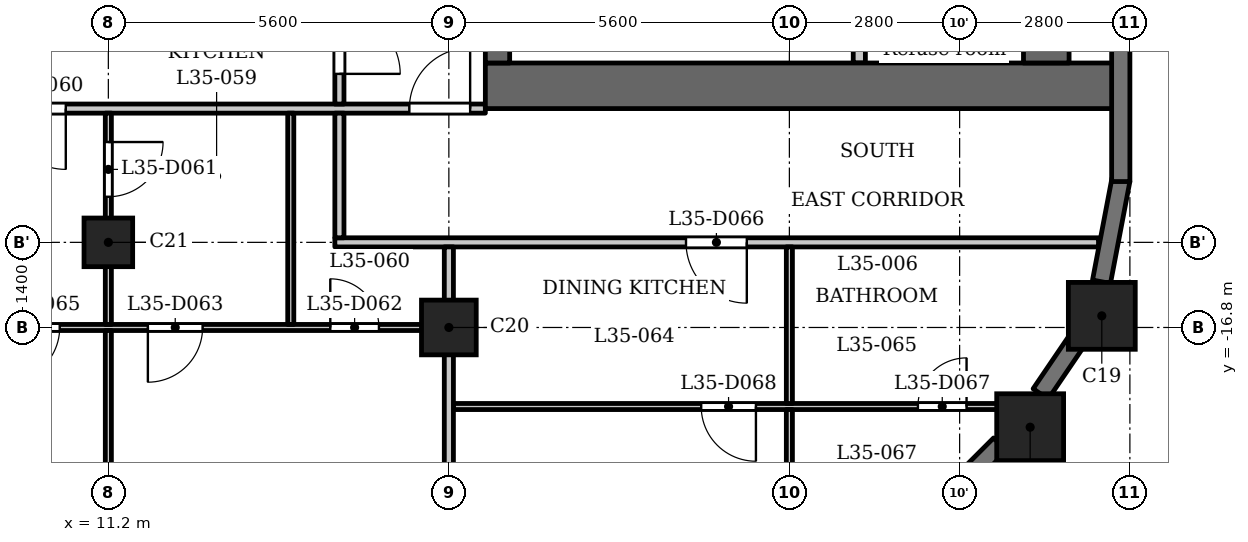
"""IFC4 building model, lengths in metres.
Left out: names, types, materials, properties, quantities, classifications, styles, units other than length and angle.
Written with IfcOpenShell. Run it as: python <this file> out.ifc"""

import sys

from ifc_helpers import new_model, si_unit, direction, frame, frame_2d, origin, origin_2d, place, context, subcontext, project, spatial, rectangle, extrude, element, fill, save


model = new_model("IFC4")
c1 = context("Model", 3, precision=1e-05, world=origin(), true_north=direction((0.0, 1.0)))
c2 = subcontext(c1, "Body", "Model", "MODEL_VIEW")
j1 = project(units=[si_unit("LENGTHUNIT", "METRE"), si_unit("PLANEANGLEUNIT", "RADIAN")], contexts=[c1])
p1 = place(None, origin())
s1 = spatial("IfcSite", under=j1, at=p1, CompositionType="ELEMENT")
p2 = place(p1, origin())
s2 = spatial("IfcBuilding", under=s1, at=p2, CompositionType="ELEMENT")
p3 = place(p2, frame((0.0, 0.0, 139.6)))
s3 = spatial("IfcBuildingStorey", under=s2, at=p3, CompositionType="ELEMENT", Elevation=139.6)
for number, where, z_axis, x_axis in (
    (1, (26.36, -18.44, 0.0), (0.0, 0.0, 1.0), (1.0, 0.0, 0.0)),
    (2, (27.538, -16.609, 0.0), (0.0, 0.0, 1.0), (1.0, 0.0, 0.0)),
):
    element("IfcColumn", number, at=place(p3, frame(where, z_axis=z_axis, x_axis=x_axis)), inside=s3, PredefinedType="COLUMN", context=c2, shape_type="SweptSolid", body=[
        extrude(rectangle(XDim=1.1, YDim=1.1, at=origin_2d()), origin(), (0.0, 0.0, 1.0), 3.5),
    ])
p4 = place(p3, frame((16.8, -16.8, 0.0), z_axis=(0.0, 0.0, 1.0), x_axis=(1.0, 0.0, 0.0)))
e3 = element("IfcColumn", 3, at=p4, inside=s3, PredefinedType="COLUMN", context=c2, shape_type="SweptSolid", body=[
    extrude(rectangle(XDim=0.9, YDim=0.9, at=origin_2d()), origin(), (0.0, 0.0, 1.0), 3.5),
])
p5 = place(p3, frame((11.2, -15.4, 0.0), z_axis=(0.0, 0.0, 1.0), x_axis=(1.0, 0.0, 0.0)))
e4 = element("IfcColumn", 4, at=p5, inside=s3, PredefinedType="COLUMN", context=c2, shape_type="SweptSolid", body=[
    extrude(rectangle(XDim=0.8, YDim=0.8, at=origin_2d()), origin(), (0.0, 0.0, 1.0), 3.5),
])
p6 = place(p3, frame((23.991, -20.597, 0.0), z_axis=(0.0, 0.0, 1.0), x_axis=(0.707106781187, 0.707106781187, 0.0)))
e5 = element("IfcWall", 5, at=p6, inside=s3, PredefinedType="SOLIDWALL", context=c2, shape_type="SweptSolid", body=[
    extrude(rectangle(XDim=2.65, YDim=0.3, at=frame_2d((1.325, 0.0))), origin(), (0.0, 0.0, 1.0), 2.45),
])
p7 = place(p6, frame((0.725, 0.0, 0.6)))
e6 = element("IfcOpeningElement", 6, at=p7, cuts=e5, PredefinedType="OPENING", context=c2, shape_type="SweptSolid", body=[
    extrude(rectangle(XDim=1.2, YDim=1.55, at=frame_2d((0.6, 0.775))), frame((0.0, 0.16, 0.0), z_axis=(0.0, -1.0, 0.0), x_axis=(1.0, 0.0, 0.0)), (0.0, 0.0, 1.0), 0.32),
])
p8 = place(p3, frame((26.532, -17.893, 0.0), z_axis=(0.0, 0.0, 1.0), x_axis=(0.562105419172, 0.82706559458, 0.0)))
e7 = element("IfcWall", 7, at=p8, inside=s3, PredefinedType="SOLIDWALL", context=c2, shape_type="SweptSolid", body=[
    extrude(rectangle(XDim=1.077, YDim=0.3, at=frame_2d((0.539, 0.0))), origin(), (0.0, 0.0, 1.0), 3.2),
])
p9 = place(p3, frame((27.533, -16.048, 0.0), z_axis=(0.0, 0.0, 1.0), x_axis=(0.187302784601, 0.982302227871, 0.0)))
e8 = element("IfcWall", 8, at=p9, inside=s3, PredefinedType="SOLIDWALL", context=c2, shape_type="SweptSolid", body=[
    extrude(rectangle(XDim=1.706, YDim=0.3, at=frame_2d((0.853, 0.0))), origin(), (0.0, 0.0, 1.0), 2.45),
])
p10 = place(p3, frame((27.85, -14.4, 0.0), z_axis=(0.0, 0.0, 1.0), x_axis=(0.0, 1.0, 0.0)))
e9 = element("IfcWall", 9, at=p10, inside=s3, PredefinedType="SOLIDWALL", context=c2, shape_type="SweptSolid", body=[
    extrude(rectangle(XDim=2.65, YDim=0.3, at=frame_2d((1.325, 0.0))), origin(), (0.0, 0.0, 1.0), 2.45),
])
p11 = place(p3, frame((17.4, -12.825, 0.0), z_axis=(0.0, 0.0, 1.0), x_axis=(1.0, 0.0, 0.0)))
e10 = element("IfcWall", 10, at=p11, inside=s3, PredefinedType="SHEAR", context=c2, shape_type="SweptSolid", body=[
    extrude(rectangle(XDim=10.4, YDim=0.75, at=frame_2d((5.2, 0.0))), origin(), (0.0, 0.0, 1.0), 3.2),
])
p12 = place(p3, frame((17.6, -12.45, 0.0), z_axis=(0.0, 0.0, 1.0), x_axis=(0.0, 1.0, 0.0)))
e11 = element("IfcWall", 11, at=p12, inside=s3, PredefinedType="SHEAR", context=c2, shape_type="SweptSolid", body=[
    extrude(rectangle(XDim=24.9, YDim=0.4, at=frame_2d((12.45, 0.0))), origin(), (0.0, 0.0, 1.0), 3.2),
])
p13 = place(p12, frame((8.65, 0.0, 0.0)))
e12 = element("IfcOpeningElement", 12, at=p13, cuts=e11, PredefinedType="OPENING", context=c2, shape_type="SweptSolid", body=[
    extrude(rectangle(XDim=0.9, YDim=2.1, at=frame_2d((0.45, 1.05))), frame((0.0, 0.21, 0.0), z_axis=(0.0, -1.0, 0.0), x_axis=(1.0, 0.0, 0.0)), (0.0, 0.0, 1.0), 0.42),
])
p14 = place(p12, frame((15.6, 0.0, 0.0)))
e13 = element("IfcOpeningElement", 13, at=p14, cuts=e11, PredefinedType="OPENING", context=c2, shape_type="SweptSolid", body=[
    extrude(rectangle(XDim=1.1, YDim=2.1, at=frame_2d((0.55, 1.05))), frame((0.0, 0.21, 0.0), z_axis=(0.0, -1.0, 0.0), x_axis=(1.0, 0.0, 0.0)), (0.0, 0.0, 1.0), 0.42),
])
p15 = place(p12, frame((18.0, 0.0, 0.0)))
e14 = element("IfcOpeningElement", 14, at=p15, cuts=e11, PredefinedType="OPENING", context=c2, shape_type="SweptSolid", body=[
    extrude(rectangle(XDim=1.1, YDim=2.1, at=frame_2d((0.55, 1.05))), frame((0.0, 0.21, 0.0), z_axis=(0.0, -1.0, 0.0), x_axis=(1.0, 0.0, 0.0)), (0.0, 0.0, 1.0), 0.42),
])
p16 = place(p12, frame((23.025, 0.0, 0.0)))
e15 = element("IfcOpeningElement", 15, at=p16, cuts=e11, PredefinedType="OPENING", context=c2, shape_type="SweptSolid", body=[
    extrude(rectangle(XDim=1.1, YDim=2.1, at=frame_2d((0.55, 1.05))), frame((0.0, 0.21, 0.0), z_axis=(0.0, -1.0, 0.0), x_axis=(1.0, 0.0, 0.0)), (0.0, 0.0, 1.0), 0.42),
])
p17 = place(p12, frame((0.775, 0.0, 0.0)))
e16 = element("IfcOpeningElement", 16, at=p17, cuts=e11, PredefinedType="OPENING", context=c2, shape_type="SweptSolid", body=[
    extrude(rectangle(XDim=1.1, YDim=2.1, at=frame_2d((0.55, 1.05))), frame((0.0, 0.21, 0.0), z_axis=(0.0, -1.0, 0.0), x_axis=(1.0, 0.0, 0.0)), (0.0, 0.0, 1.0), 0.42),
])
p18 = place(p12, frame((12.925, 0.0, 0.0)))
e17 = element("IfcOpeningElement", 17, at=p18, cuts=e11, PredefinedType="OPENING", context=c2, shape_type="SweptSolid", body=[
    extrude(rectangle(XDim=1.8, YDim=2.1, at=frame_2d((0.9, 1.05))), frame((0.0, 0.21, 0.0), z_axis=(0.0, -1.0, 0.0), x_axis=(1.0, 0.0, 0.0)), (0.0, 0.0, 1.0), 0.42),
])
p19 = place(p3, frame((26.625, -12.45, 0.0), z_axis=(0.0, 0.0, 1.0), x_axis=(0.0, 1.0, 0.0)))
e18 = element("IfcWall", 18, at=p19, inside=s3, PredefinedType="SHEAR", context=c2, shape_type="SweptSolid", body=[
    extrude(rectangle(XDim=24.9, YDim=0.75, at=frame_2d((12.45, 0.0))), origin(), (0.0, 0.0, 1.0), 3.2),
])
p20 = place(p3, frame((23.55, -12.45, 0.0), z_axis=(0.0, 0.0, 1.0), x_axis=(0.0, 1.0, 0.0)))
e19 = element("IfcWall", 19, at=p20, inside=s3, PredefinedType="PARTITIONING", context=c2, shape_type="SweptSolid", body=[
    extrude(rectangle(XDim=2.65, YDim=0.2, at=frame_2d((1.325, 0.0))), origin(), (0.0, 0.0, 1.0), 3.2),
])
p21 = place(p20, frame((0.875, 0.0, 0.0)))
e20 = element("IfcOpeningElement", 20, at=p21, cuts=e19, PredefinedType="OPENING", context=c2, shape_type="SweptSolid", body=[
    extrude(rectangle(XDim=0.9, YDim=2.1, at=frame_2d((0.45, 1.05))), frame((0.0, 0.11, 0.0), z_axis=(0.0, -1.0, 0.0), x_axis=(1.0, 0.0, 0.0)), (0.0, 0.0, 1.0), 0.22),
])
p22 = place(p3, frame((16.875, -18.1, 0.0), z_axis=(0.0, 0.0, 1.0), x_axis=(1.0, 0.0, 0.0)))
e21 = element("IfcWall", 21, at=p22, inside=s3, PredefinedType="PARTITIONING", context=c2, shape_type="SweptSolid", body=[
    extrude(rectangle(XDim=9.565, YDim=0.1, at=frame_2d((4.782, 0.0))), origin(), (0.0, 0.0, 1.0), 3.2),
])
p23 = place(p22, frame((7.639, 0.0, 0.0)))
e22 = element("IfcOpeningElement", 22, at=p23, cuts=e21, PredefinedType="OPENING", context=c2, shape_type="SweptSolid", body=[
    extrude(rectangle(XDim=0.8, YDim=2.1, at=frame_2d((0.4, 1.05))), frame((0.0, 0.06, 0.0), z_axis=(0.0, -1.0, 0.0), x_axis=(1.0, 0.0, 0.0)), (0.0, 0.0, 1.0), 0.12),
])
p24 = place(p22, frame((4.075, 0.0, 0.0)))
e23 = element("IfcOpeningElement", 23, at=p24, cuts=e21, PredefinedType="OPENING", context=c2, shape_type="SweptSolid", body=[
    extrude(rectangle(XDim=0.9, YDim=2.1, at=frame_2d((0.45, 1.05))), frame((0.0, 0.06, 0.0), z_axis=(0.0, -1.0, 0.0), x_axis=(1.0, 0.0, 0.0)), (0.0, 0.0, 1.0), 0.12),
])
p25 = place(p3, frame((-16.725, -16.8, 0.0), z_axis=(0.0, 0.0, 1.0), x_axis=(1.0, 0.0, 0.0)))
e24 = element("IfcWall", 24, at=p25, inside=s3, PredefinedType="PARTITIONING", context=c2, shape_type="SweptSolid", body=[
    extrude(rectangle(XDim=33.45, YDim=0.1, at=frame_2d((16.725, 0.0))), origin(), (0.0, 0.0, 1.0), 3.2),
])
p26 = place(p25, frame((0.575, 0.0, 0.0)))
e25 = element("IfcOpeningElement", 25, at=p26, cuts=e24, PredefinedType="OPENING", context=c2, shape_type="SweptSolid", body=[
    extrude(rectangle(XDim=0.8, YDim=2.1, at=frame_2d((0.4, 1.05))), frame((0.0, 0.06, 0.0), z_axis=(0.0, -1.0, 0.0), x_axis=(1.0, 0.0, 0.0)), (0.0, 0.0, 1.0), 0.12),
])
p27 = place(p25, frame((6.175, 0.0, 0.0)))
e26 = element("IfcOpeningElement", 26, at=p27, cuts=e24, PredefinedType="OPENING", context=c2, shape_type="SweptSolid", body=[
    extrude(rectangle(XDim=0.9, YDim=2.1, at=frame_2d((0.45, 1.05))), frame((0.0, 0.06, 0.0), z_axis=(0.0, -1.0, 0.0), x_axis=(1.0, 0.0, 0.0)), (0.0, 0.0, 1.0), 0.12),
])
p28 = place(p25, frame((15.275, 0.0, 0.0)))
e27 = element("IfcOpeningElement", 27, at=p28, cuts=e24, PredefinedType="OPENING", context=c2, shape_type="SweptSolid", body=[
    extrude(rectangle(XDim=0.8, YDim=2.1, at=frame_2d((0.4, 1.05))), frame((0.0, 0.06, 0.0), z_axis=(0.0, -1.0, 0.0), x_axis=(1.0, 0.0, 0.0)), (0.0, 0.0, 1.0), 0.12),
])
p29 = place(p25, frame((11.775, 0.0, 0.0)))
e28 = element("IfcOpeningElement", 28, at=p29, cuts=e24, PredefinedType="OPENING", context=c2, shape_type="SweptSolid", body=[
    extrude(rectangle(XDim=0.9, YDim=2.1, at=frame_2d((0.45, 1.05))), frame((0.0, 0.06, 0.0), z_axis=(0.0, -1.0, 0.0), x_axis=(1.0, 0.0, 0.0)), (0.0, 0.0, 1.0), 0.12),
])
p30 = place(p25, frame((17.275, 0.0, 0.0)))
e29 = element("IfcOpeningElement", 29, at=p30, cuts=e24, PredefinedType="OPENING", context=c2, shape_type="SweptSolid", body=[
    extrude(rectangle(XDim=0.8, YDim=2.1, at=frame_2d((0.4, 1.05))), frame((0.0, 0.06, 0.0), z_axis=(0.0, -1.0, 0.0), x_axis=(1.0, 0.0, 0.0)), (0.0, 0.0, 1.0), 0.12),
])
p31 = place(p25, frame((20.775, 0.0, 0.0)))
e30 = element("IfcOpeningElement", 30, at=p31, cuts=e24, PredefinedType="OPENING", context=c2, shape_type="SweptSolid", body=[
    extrude(rectangle(XDim=0.9, YDim=2.1, at=frame_2d((0.45, 1.05))), frame((0.0, 0.06, 0.0), z_axis=(0.0, -1.0, 0.0), x_axis=(1.0, 0.0, 0.0)), (0.0, 0.0, 1.0), 0.12),
])
p32 = place(p25, frame((31.575, 0.0, 0.0)))
e31 = element("IfcOpeningElement", 31, at=p32, cuts=e24, PredefinedType="OPENING", context=c2, shape_type="SweptSolid", body=[
    extrude(rectangle(XDim=0.8, YDim=2.1, at=frame_2d((0.4, 1.05))), frame((0.0, 0.06, 0.0), z_axis=(0.0, -1.0, 0.0), x_axis=(1.0, 0.0, 0.0)), (0.0, 0.0, 1.0), 0.12),
])
p33 = place(p25, frame((28.575, 0.0, 0.0)))
e32 = element("IfcOpeningElement", 32, at=p33, cuts=e24, PredefinedType="OPENING", context=c2, shape_type="SweptSolid", body=[
    extrude(rectangle(XDim=0.9, YDim=2.1, at=frame_2d((0.45, 1.05))), frame((0.0, 0.06, 0.0), z_axis=(0.0, -1.0, 0.0), x_axis=(1.0, 0.0, 0.0)), (0.0, 0.0, 1.0), 0.12),
])
p34 = place(p25, frame((23.725, 0.0, 0.0)))
e33 = element("IfcOpeningElement", 33, at=p34, cuts=e24, PredefinedType="OPENING", context=c2, shape_type="SweptSolid", body=[
    extrude(rectangle(XDim=0.9, YDim=2.1, at=frame_2d((0.45, 1.05))), frame((0.0, 0.06, 0.0), z_axis=(0.0, -1.0, 0.0), x_axis=(1.0, 0.0, 0.0)), (0.0, 0.0, 1.0), 0.12),
])
p35 = place(p25, frame((26.225, 0.0, 0.0)))
e34 = element("IfcOpeningElement", 34, at=p35, cuts=e24, PredefinedType="OPENING", context=c2, shape_type="SweptSolid", body=[
    extrude(rectangle(XDim=0.9, YDim=2.1, at=frame_2d((0.45, 1.05))), frame((0.0, 0.06, 0.0), z_axis=(0.0, -1.0, 0.0), x_axis=(1.0, 0.0, 0.0)), (0.0, 0.0, 1.0), 0.12),
])
p36 = place(p3, frame((14.925, -15.4, 0.0), z_axis=(0.0, 0.0, 1.0), x_axis=(1.0, 0.0, 0.0)))
e35 = element("IfcWall", 35, at=p36, inside=s3, PredefinedType="PARTITIONING", context=c2, shape_type="SweptSolid", body=[
    extrude(rectangle(XDim=12.559, YDim=0.15, at=frame_2d((6.279, 0.0))), origin(), (0.0, 0.0, 1.0), 3.2),
])
p37 = place(p36, frame((5.775, 0.0, 0.0)))
e36 = element("IfcOpeningElement", 36, at=p37, cuts=e35, PredefinedType="OPENING", context=c2, shape_type="SweptSolid", body=[
    extrude(rectangle(XDim=1.0, YDim=2.1, at=frame_2d((0.5, 1.05))), frame((0.0, 0.085, 0.0), z_axis=(0.0, -1.0, 0.0), x_axis=(1.0, 0.0, 0.0)), (0.0, 0.0, 1.0), 0.17),
])
p38 = place(p3, frame((-17.4, -13.2, 0.0), z_axis=(0.0, 0.0, 1.0), x_axis=(1.0, 0.0, 0.0)))
e37 = element("IfcWall", 37, at=p38, inside=s3, PredefinedType="PARTITIONING", context=c2, shape_type="SweptSolid", body=[
    extrude(rectangle(XDim=34.8, YDim=0.15, at=frame_2d((17.4, 0.0))), origin(), (0.0, 0.0, 1.0), 3.2),
])
p39 = place(p38, frame((0.15, 0.0, 0.0)))
e38 = element("IfcOpeningElement", 38, at=p39, cuts=e37, PredefinedType="OPENING", context=c2, shape_type="SweptSolid", body=[
    extrude(rectangle(XDim=1.0, YDim=2.1, at=frame_2d((0.5, 1.05))), frame((0.0, 0.085, 0.0), z_axis=(0.0, -1.0, 0.0), x_axis=(1.0, 0.0, 0.0)), (0.0, 0.0, 1.0), 0.17),
])
p40 = place(p38, frame((33.55, 0.0, 0.0)))
e39 = element("IfcOpeningElement", 39, at=p40, cuts=e37, PredefinedType="OPENING", context=c2, shape_type="SweptSolid", body=[
    extrude(rectangle(XDim=1.0, YDim=2.1, at=frame_2d((0.5, 1.05))), frame((0.0, 0.085, 0.0), z_axis=(0.0, -1.0, 0.0), x_axis=(1.0, 0.0, 0.0)), (0.0, 0.0, 1.0), 0.17),
])
p41 = place(p38, frame((6.85, 0.0, 0.0)))
e40 = element("IfcOpeningElement", 40, at=p41, cuts=e37, PredefinedType="OPENING", context=c2, shape_type="SweptSolid", body=[
    extrude(rectangle(XDim=1.0, YDim=2.1, at=frame_2d((0.5, 1.05))), frame((0.0, 0.085, 0.0), z_axis=(0.0, -1.0, 0.0), x_axis=(1.0, 0.0, 0.0)), (0.0, 0.0, 1.0), 0.17),
])
p42 = place(p38, frame((12.45, 0.0, 0.0)))
e41 = element("IfcOpeningElement", 41, at=p42, cuts=e37, PredefinedType="OPENING", context=c2, shape_type="SweptSolid", body=[
    extrude(rectangle(XDim=1.0, YDim=2.1, at=frame_2d((0.5, 1.05))), frame((0.0, 0.085, 0.0), z_axis=(0.0, -1.0, 0.0), x_axis=(1.0, 0.0, 0.0)), (0.0, 0.0, 1.0), 0.17),
])
p43 = place(p38, frame((21.3, 0.0, 0.0)))
e42 = element("IfcOpeningElement", 42, at=p43, cuts=e37, PredefinedType="OPENING", context=c2, shape_type="SweptSolid", body=[
    extrude(rectangle(XDim=1.0, YDim=2.1, at=frame_2d((0.5, 1.05))), frame((0.0, 0.085, 0.0), z_axis=(0.0, -1.0, 0.0), x_axis=(1.0, 0.0, 0.0)), (0.0, 0.0, 1.0), 0.17),
])
p44 = place(p38, frame((26.9, 0.0, 0.0)))
e43 = element("IfcOpeningElement", 43, at=p44, cuts=e37, PredefinedType="OPENING", context=c2, shape_type="SweptSolid", body=[
    extrude(rectangle(XDim=1.0, YDim=2.1, at=frame_2d((0.5, 1.05))), frame((0.0, 0.085, 0.0), z_axis=(0.0, -1.0, 0.0), x_axis=(1.0, 0.0, 0.0)), (0.0, 0.0, 1.0), 0.17),
])
p45 = place(p3, frame((11.2, -22.93, 0.0), z_axis=(0.0, 0.0, 1.0), x_axis=(0.0, 1.0, 0.0)))
e44 = element("IfcWall", 44, at=p45, inside=s3, PredefinedType="PARTITIONING", context=c2, shape_type="SweptSolid", body=[
    extrude(rectangle(XDim=6.08, YDim=0.1, at=frame_2d((3.04, 0.0))), origin(), (0.0, 0.0, 1.0), 3.2),
])
p46 = place(p3, frame((11.2, -16.75, 0.0), z_axis=(0.0, 0.0, 1.0), x_axis=(0.0, 1.0, 0.0)))
e45 = element("IfcWall", 45, at=p46, inside=s3, PredefinedType="PARTITIONING", context=c2, shape_type="SweptSolid", body=[
    extrude(rectangle(XDim=3.475, YDim=0.1, at=frame_2d((1.738, 0.0))), origin(), (0.0, 0.0, 1.0), 3.2),
])
p47 = place(p46, frame((2.1, 0.0, 0.0)))
e46 = element("IfcOpeningElement", 46, at=p47, cuts=e45, PredefinedType="OPENING", context=c2, shape_type="SweptSolid", body=[
    extrude(rectangle(XDim=0.9, YDim=2.1, at=frame_2d((0.45, 1.05))), frame((0.0, 0.06, 0.0), z_axis=(0.0, -1.0, 0.0), x_axis=(1.0, 0.0, 0.0)), (0.0, 0.0, 1.0), 0.12),
])
p48 = place(p3, frame((14.2, -16.75, 0.0), z_axis=(0.0, 0.0, 1.0), x_axis=(0.0, 1.0, 0.0)))
e47 = element("IfcWall", 47, at=p48, inside=s3, PredefinedType="PARTITIONING", context=c2, shape_type="SweptSolid", body=[
    extrude(rectangle(XDim=3.475, YDim=0.1, at=frame_2d((1.738, 0.0))), origin(), (0.0, 0.0, 1.0), 3.2),
])
p49 = place(p3, frame((15.0, -15.325, 0.0), z_axis=(0.0, 0.0, 1.0), x_axis=(0.0, 1.0, 0.0)))
e48 = element("IfcWall", 48, at=p49, inside=s3, PredefinedType="PARTITIONING", context=c2, shape_type="SweptSolid", body=[
    extrude(rectangle(XDim=2.05, YDim=0.15, at=frame_2d((1.025, 0.0))), origin(), (0.0, 0.0, 1.0), 3.2),
])
p50 = place(p3, frame((15.0, -13.125, 0.0), z_axis=(0.0, 0.0, 1.0), x_axis=(0.0, 1.0, 0.0)))
e49 = element("IfcWall", 49, at=p50, inside=s3, PredefinedType="PARTITIONING", context=c2, shape_type="SweptSolid", body=[
    extrude(rectangle(XDim=6.356, YDim=0.15, at=frame_2d((3.178, 0.0))), origin(), (0.0, 0.0, 1.0), 3.2),
])
p51 = place(p50, frame((0.496, 0.0, 0.0)))
e50 = element("IfcOpeningElement", 50, at=p51, cuts=e49, PredefinedType="OPENING", context=c2, shape_type="SweptSolid", body=[
    extrude(rectangle(XDim=1.0, YDim=2.1, at=frame_2d((0.5, 1.05))), frame((0.0, 0.085, 0.0), z_axis=(0.0, -1.0, 0.0), x_axis=(1.0, 0.0, 0.0)), (0.0, 0.0, 1.0), 0.17),
])
p52 = place(p3, frame((16.8, -22.93, 0.0), z_axis=(0.0, 0.0, 1.0), x_axis=(0.0, 1.0, 0.0)))
e51 = element("IfcWall", 51, at=p52, inside=s3, PredefinedType="PARTITIONING", context=c2, shape_type="SweptSolid", body=[
    extrude(rectangle(XDim=7.455, YDim=0.15, at=frame_2d((3.728, 0.0))), origin(), (0.0, 0.0, 1.0), 3.2),
])
p53 = place(p3, frame((22.4, -21.72, 0.0), z_axis=(0.0, 0.0, 1.0), x_axis=(0.0, 1.0, 0.0)))
e52 = element("IfcWall", 52, at=p53, inside=s3, PredefinedType="PARTITIONING", context=c2, shape_type="SweptSolid", body=[
    extrude(rectangle(XDim=3.57, YDim=0.1, at=frame_2d((1.785, 0.0))), origin(), (0.0, 0.0, 1.0), 3.2),
])
p54 = place(p53, frame((0.872, 0.0, 0.0)))
e53 = element("IfcOpeningElement", 53, at=p54, cuts=e52, PredefinedType="OPENING", context=c2, shape_type="SweptSolid", body=[
    extrude(rectangle(XDim=0.9, YDim=2.1, at=frame_2d((0.45, 1.05))), frame((0.0, 0.06, 0.0), z_axis=(0.0, -1.0, 0.0), x_axis=(1.0, 0.0, 0.0)), (0.0, 0.0, 1.0), 0.12),
])
p55 = place(p3, frame((22.4, -18.05, 0.0), z_axis=(0.0, 0.0, 1.0), x_axis=(0.0, 1.0, 0.0)))
e54 = element("IfcWall", 54, at=p55, inside=s3, PredefinedType="PARTITIONING", context=c2, shape_type="SweptSolid", body=[
    extrude(rectangle(XDim=2.575, YDim=0.1, at=frame_2d((1.288, 0.0))), origin(), (0.0, 0.0, 1.0), 3.2),
])
p56 = place(p51, origin())
e55 = element("IfcDoor", 55, at=p56, inside=s3, OperationType="SINGLE_SWING_LEFT", PredefinedType="DOOR", context=c2, shape_type="SweptSolid", body=[
    extrude(rectangle(XDim=1.0, YDim=2.1, at=frame_2d((0.5, 1.05))), frame((0.0, 0.025, 0.0), z_axis=(0.0, -1.0, 0.0), x_axis=(1.0, 0.0, 0.0)), (0.0, 0.0, 1.0), 0.05),
])
fill(e50, e55)
p57 = place(p40, origin())
e56 = element("IfcDoor", 56, at=p57, inside=s3, OperationType="SINGLE_SWING_LEFT", PredefinedType="DOOR", context=c2, shape_type="SweptSolid", body=[
    extrude(rectangle(XDim=1.0, YDim=2.1, at=frame_2d((0.5, 1.05))), frame((0.0, 0.025, 0.0), z_axis=(0.0, -1.0, 0.0), x_axis=(1.0, 0.0, 0.0)), (0.0, 0.0, 1.0), 0.05),
])
fill(e39, e56)
p58 = place(p44, origin())
e57 = element("IfcDoor", 57, at=p58, inside=s3, OperationType="SINGLE_SWING_RIGHT", PredefinedType="DOOR", context=c2, shape_type="SweptSolid", body=[
    extrude(rectangle(XDim=1.0, YDim=2.1, at=frame_2d((0.5, 1.05))), frame((0.0, 0.025, 0.0), z_axis=(0.0, -1.0, 0.0), x_axis=(1.0, 0.0, 0.0)), (0.0, 0.0, 1.0), 0.05),
])
fill(e43, e57)
p59 = place(p47, origin())
e58 = element("IfcDoor", 58, at=p59, inside=s3, OperationType="SINGLE_SWING_RIGHT", PredefinedType="DOOR", context=c2, shape_type="SweptSolid", body=[
    extrude(rectangle(XDim=0.9, YDim=2.1, at=frame_2d((0.45, 1.05))), frame((0.0, 0.025, 0.0), z_axis=(0.0, -1.0, 0.0), x_axis=(1.0, 0.0, 0.0)), (0.0, 0.0, 1.0), 0.05),
])
fill(e46, e58)
p60 = place(p32, origin())
e59 = element("IfcDoor", 59, at=p60, inside=s3, OperationType="SINGLE_SWING_RIGHT", PredefinedType="DOOR", context=c2, shape_type="SweptSolid", body=[
    extrude(rectangle(XDim=0.8, YDim=2.1, at=frame_2d((0.4, 1.05))), frame((0.0, 0.025, 0.0), z_axis=(0.0, -1.0, 0.0), x_axis=(1.0, 0.0, 0.0)), (0.0, 0.0, 1.0), 0.05),
])
fill(e31, e59)
p61 = place(p33, origin())
e60 = element("IfcDoor", 60, at=p61, inside=s3, OperationType="SINGLE_SWING_LEFT", PredefinedType="DOOR", context=c2, shape_type="SweptSolid", body=[
    extrude(rectangle(XDim=0.9, YDim=2.1, at=frame_2d((0.45, 1.05))), frame((0.0, 0.025, 0.0), z_axis=(0.0, -1.0, 0.0), x_axis=(1.0, 0.0, 0.0)), (0.0, 0.0, 1.0), 0.05),
])
fill(e32, e60)
p62 = place(p35, origin())
e61 = element("IfcDoor", 61, at=p62, inside=s3, OperationType="SINGLE_SWING_LEFT", PredefinedType="DOOR", context=c2, shape_type="SweptSolid", body=[
    extrude(rectangle(XDim=0.9, YDim=2.1, at=frame_2d((0.45, 1.05))), frame((0.0, 0.025, 0.0), z_axis=(0.0, -1.0, 0.0), x_axis=(1.0, 0.0, 0.0)), (0.0, 0.0, 1.0), 0.05),
])
fill(e34, e61)
p63 = place(p37, origin())
e62 = element("IfcDoor", 62, at=p63, inside=s3, OperationType="SINGLE_SWING_RIGHT", PredefinedType="DOOR", context=c2, shape_type="SweptSolid", body=[
    extrude(rectangle(XDim=1.0, YDim=2.1, at=frame_2d((0.5, 1.05))), frame((0.0, 0.025, 0.0), z_axis=(0.0, -1.0, 0.0), x_axis=(1.0, 0.0, 0.0)), (0.0, 0.0, 1.0), 0.05),
])
fill(e36, e62)
p64 = place(p23, origin())
e63 = element("IfcDoor", 63, at=p64, inside=s3, OperationType="SINGLE_SWING_LEFT", PredefinedType="DOOR", context=c2, shape_type="SweptSolid", body=[
    extrude(rectangle(XDim=0.8, YDim=2.1, at=frame_2d((0.4, 1.05))), frame((0.0, 0.025, 0.0), z_axis=(0.0, -1.0, 0.0), x_axis=(1.0, 0.0, 0.0)), (0.0, 0.0, 1.0), 0.05),
])
fill(e22, e63)
p65 = place(p24, origin())
e64 = element("IfcDoor", 64, at=p65, inside=s3, OperationType="SINGLE_SWING_RIGHT", PredefinedType="DOOR", context=c2, shape_type="SweptSolid", body=[
    extrude(rectangle(XDim=0.9, YDim=2.1, at=frame_2d((0.45, 1.05))), frame((0.0, 0.025, 0.0), z_axis=(0.0, -1.0, 0.0), x_axis=(1.0, 0.0, 0.0)), (0.0, 0.0, 1.0), 0.05),
])
fill(e23, e64)
save(model, sys.argv[1])
